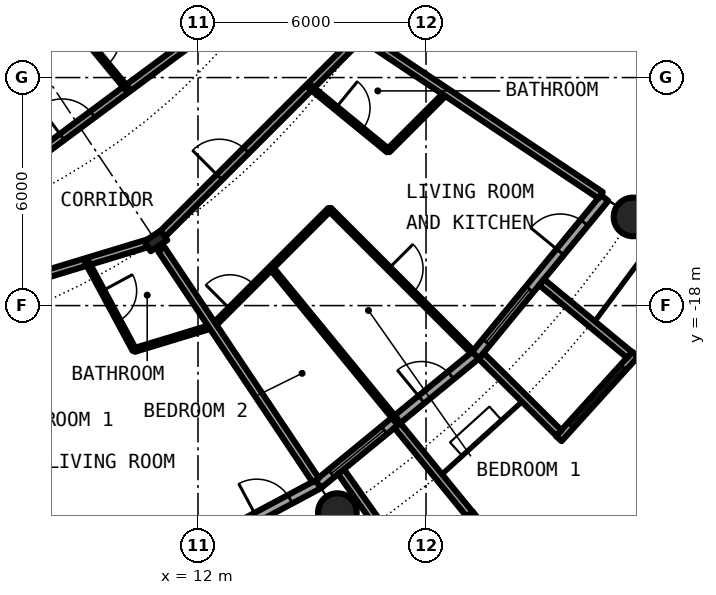
"""IFC4 building model, lengths in metres.
Left out: names, types, materials, properties, quantities, classifications, styles, units other than length and angle.
Written with IfcOpenShell. Run it as: python <this file> out.ifc"""

import sys

from ifc_helpers import new_model, si_unit, direction, frame, frame_2d, origin, origin_2d, place, context, subcontext, project, spatial, rectangle, circle, hollow_circle, i_section, extrude, element, fill, save


model = new_model("IFC4")
c1 = context("Model", 3, precision=1e-05, world=origin(), true_north=direction((0.0, 1.0)))
c2 = subcontext(c1, "Body", "Model", "MODEL_VIEW")
j1 = project(units=[si_unit("LENGTHUNIT", "METRE"), si_unit("PLANEANGLEUNIT", "RADIAN")], contexts=[c1])
p1 = place(None, origin())
s1 = spatial("IfcSite", under=j1, at=p1, CompositionType="ELEMENT")
p2 = place(p1, origin())
s2 = spatial("IfcBuilding", under=s1, at=p2, CompositionType="ELEMENT")
p3 = place(p2, frame((0.0, 0.0, 72.75)))
s3 = spatial("IfcBuildingStorey", under=s2, at=p3, CompositionType="ELEMENT", Elevation=72.75)
for number, where, z_axis, x_axis in (
    (1, (15.667, -23.448, 0.0), (0.0, 0.0, 1.0), (1.0, 0.0, 0.0)),
    (2, (23.448, -15.667, 0.0), (0.0, 0.0, 1.0), (1.0, 0.0, 0.0)),
):
    element("IfcColumn", number, at=place(p3, frame(where, z_axis=z_axis, x_axis=x_axis)), inside=s3, PredefinedType="COLUMN", context=c2, shape_type="SweptSolid", body=[
        extrude(hollow_circle(Radius=0.508, WallThickness=0.04, at=origin_2d()), origin(), (0.0, 0.0, 1.0), 3.05),
    ])
p4 = place(p3, frame((10.889, -16.297, 0.0), z_axis=(0.0, 0.0, 1.0), x_axis=(0.55557023302, -0.831469612303, 0.0)))
e3 = element("IfcColumn", 3, at=p4, inside=s3, PredefinedType="COLUMN", context=c2, shape_type="SweptSolid", body=[
    extrude(i_section(OverallWidth=0.306, OverallDepth=0.524, WebThickness=0.021, FlangeThickness=0.04, FilletRadius=0.027, at=origin_2d()), origin(), (0.0, 0.0, 1.0), 3.05),
])
p5 = place(p3, frame((10.447, -25.222, 0.0), z_axis=(0.0, 0.0, 1.0), x_axis=(0.881915646801, 0.471407246368, 0.0)))
e4 = element("IfcWall", 4, at=p5, inside=s3, PredefinedType="SOLIDWALL", context=c2, shape_type="SweptSolid", body=[
    extrude(rectangle(XDim=5.352, YDim=0.25, at=frame_2d((2.676, 0.0))), origin(), (0.0, 0.0, 1.0), 2.7),
])
p6 = place(p5, frame((0.441, 0.0, 0.3)))
e5 = element("IfcOpeningElement", 5, at=p6, cuts=e4, PredefinedType="OPENING", context=c2, shape_type="SweptSolid", body=[
    extrude(rectangle(XDim=1.8, YDim=2.1, at=frame_2d((0.9, 1.05))), frame((0.0, 0.135, 0.0), z_axis=(0.0, -1.0, 0.0), x_axis=(1.0, 0.0, 0.0)), (0.0, 0.0, 1.0), 0.27),
])
p7 = place(p5, frame((3.51, 0.0, 0.0)))
e6 = element("IfcOpeningElement", 6, at=p7, cuts=e4, PredefinedType="OPENING", context=c2, shape_type="SweptSolid", body=[
    extrude(rectangle(XDim=1.0, YDim=2.2, at=frame_2d((0.5, 1.1))), frame((0.0, 0.135, 0.0), z_axis=(0.0, -1.0, 0.0), x_axis=(1.0, 0.0, 0.0)), (0.0, 0.0, 1.0), 0.27),
])
p8 = place(p3, frame((15.167, -22.699, 0.0), z_axis=(0.0, 0.0, 1.0), x_axis=(0.773019449054, 0.634382322723, 0.0)))
e7 = element("IfcWall", 7, at=p8, inside=s3, PredefinedType="SOLIDWALL", context=c2, shape_type="SweptSolid", body=[
    extrude(rectangle(XDim=5.352, YDim=0.25, at=frame_2d((2.676, 0.0))), origin(), (0.0, 0.0, 1.0), 2.7),
])
p9 = place(p8, frame((0.441, 0.0, 0.3)))
e8 = element("IfcOpeningElement", 8, at=p9, cuts=e7, PredefinedType="OPENING", context=c2, shape_type="SweptSolid", body=[
    extrude(rectangle(XDim=1.8, YDim=2.1, at=frame_2d((0.9, 1.05))), frame((0.0, 0.135, 0.0), z_axis=(0.0, -1.0, 0.0), x_axis=(1.0, 0.0, 0.0)), (0.0, 0.0, 1.0), 0.27),
])
p10 = place(p8, frame((3.51, 0.0, 0.0)))
e9 = element("IfcOpeningElement", 9, at=p10, cuts=e7, PredefinedType="OPENING", context=c2, shape_type="SweptSolid", body=[
    extrude(rectangle(XDim=1.0, YDim=2.2, at=frame_2d((0.5, 1.1))), frame((0.0, 0.135, 0.0), z_axis=(0.0, -1.0, 0.0), x_axis=(1.0, 0.0, 0.0)), (0.0, 0.0, 1.0), 0.27),
])
p11 = place(p3, frame((17.427, -24.909, -0.03), z_axis=(0.0, 0.0, 1.0), x_axis=(0.796842165306, 0.60418752353, 0.0)))
e10 = element("IfcWall", 10, at=p11, inside=s3, PredefinedType="SOLIDWALL", context=c2, shape_type="SweptSolid", body=[
    extrude(rectangle(XDim=2.337, YDim=0.2, at=frame_2d((1.168, 0.0))), origin(), (0.0, 0.0, 1.0), 2.73),
])
p12 = place(p11, frame((0.128, 0.0, 0.33)))
e11 = element("IfcOpeningElement", 11, at=p12, cuts=e10, PredefinedType="OPENING", context=c2, shape_type="SweptSolid", body=[
    extrude(circle(Radius=1.04, at=frame_2d((1.04, 1.04))), frame((0.0, 0.11, 0.0), z_axis=(0.0, -1.0, 0.0), x_axis=(1.0, 0.0, 0.0)), (0.0, 0.0, 1.0), 0.22),
])
p13 = place(p3, frame((15.765, -22.37, -0.03), z_axis=(0.0, 0.0, 1.0), x_axis=(0.576274612209, -0.817256123454, 0.0)))
e12 = element("IfcWall", 12, at=p13, inside=s3, PredefinedType="SOLIDWALL", context=c2, shape_type="SweptSolid", body=[
    extrude(rectangle(XDim=2.933, YDim=0.2, at=frame_2d((1.466, 0.0))), origin(), (0.0, 0.0, 1.0), 2.73),
])
p14 = place(p3, frame((17.246, -21.155, -0.03), z_axis=(0.0, 0.0, 1.0), x_axis=(0.631741648902, -0.775179004516, 0.0)))
e13 = element("IfcWall", 13, at=p14, inside=s3, PredefinedType="SOLIDWALL", context=c2, shape_type="SweptSolid", body=[
    extrude(rectangle(XDim=3.006, YDim=0.2, at=frame_2d((1.503, 0.0))), origin(), (0.0, 0.0, 1.0), 2.73),
])
p15 = place(p3, frame((19.304, -19.304, 0.0), z_axis=(0.0, 0.0, 1.0), x_axis=(0.634382322723, 0.773019449054, 0.0)))
e14 = element("IfcWall", 14, at=p15, inside=s3, PredefinedType="SOLIDWALL", context=c2, shape_type="SweptSolid", body=[
    extrude(rectangle(XDim=5.352, YDim=0.25, at=frame_2d((2.676, 0.0))), origin(), (0.0, 0.0, 1.0), 2.7),
])
p16 = place(p15, frame((0.441, 0.0, 0.3)))
e15 = element("IfcOpeningElement", 15, at=p16, cuts=e14, PredefinedType="OPENING", context=c2, shape_type="SweptSolid", body=[
    extrude(rectangle(XDim=1.8, YDim=2.1, at=frame_2d((0.9, 1.05))), frame((0.0, 0.135, 0.0), z_axis=(0.0, -1.0, 0.0), x_axis=(1.0, 0.0, 0.0)), (0.0, 0.0, 1.0), 0.27),
])
p17 = place(p15, frame((3.51, 0.0, 0.0)))
e16 = element("IfcOpeningElement", 16, at=p17, cuts=e14, PredefinedType="OPENING", context=c2, shape_type="SweptSolid", body=[
    extrude(rectangle(XDim=1.0, YDim=2.2, at=frame_2d((0.5, 1.1))), frame((0.0, 0.135, 0.0), z_axis=(0.0, -1.0, 0.0), x_axis=(1.0, 0.0, 0.0)), (0.0, 0.0, 1.0), 0.27),
])
p18 = place(p3, frame((21.493, -21.5, -0.03), z_axis=(0.0, 0.0, 1.0), x_axis=(0.671506829416, 0.740998365753, 0.0)))
e17 = element("IfcWall", 17, at=p18, inside=s3, PredefinedType="SOLIDWALL", context=c2, shape_type="SweptSolid", body=[
    extrude(rectangle(XDim=2.993, YDim=0.2, at=frame_2d((1.497, 0.0))), origin(), (0.0, 0.0, 1.0), 2.73),
])
p19 = place(p18, frame((0.457, 0.0, 0.33)))
e18 = element("IfcOpeningElement", 18, at=p19, cuts=e17, PredefinedType="OPENING", context=c2, shape_type="SweptSolid", body=[
    extrude(circle(Radius=1.04, at=frame_2d((1.04, 1.04))), frame((0.0, 0.11, 0.0), z_axis=(0.0, -1.0, 0.0), x_axis=(1.0, 0.0, 0.0)), (0.0, 0.0, 1.0), 0.22),
])
p20 = place(p3, frame((19.45, -19.323, -0.03), z_axis=(0.0, 0.0, 1.0), x_axis=(0.709727076896, -0.704476739375, 0.0)))
e19 = element("IfcWall", 19, at=p20, inside=s3, PredefinedType="SOLIDWALL", context=c2, shape_type="SweptSolid", body=[
    extrude(rectangle(XDim=2.883, YDim=0.2, at=frame_2d((1.441, 0.0))), origin(), (0.0, 0.0, 1.0), 2.73),
])
p21 = place(p3, frame((21.041, -17.384, -0.03), z_axis=(0.0, 0.0, 1.0), x_axis=(0.770784861449, -0.63709551667, 0.0)))
e20 = element("IfcWall", 20, at=p21, inside=s3, PredefinedType="SOLIDWALL", context=c2, shape_type="SweptSolid", body=[
    extrude(rectangle(XDim=3.006, YDim=0.2, at=frame_2d((1.503, 0.0))), origin(), (0.0, 0.0, 1.0), 2.73),
])
p22 = place(p3, frame((12.386, -18.545, 0.0), z_axis=(0.0, 0.0, 1.0), x_axis=(0.707106781187, 0.707106781187, 0.0)))
e21 = element("IfcWall", 21, at=p22, inside=s3, PredefinedType="PARTITIONING", context=c2, shape_type="SweptSolid", body=[
    extrude(rectangle(XDim=4.351, YDim=0.1, at=frame_2d((2.176, 0.0))), origin(), (0.0, 0.0, 1.0), 2.7),
])
p23 = place(p22, frame((0.644, 0.0, 0.0)))
e22 = element("IfcOpeningElement", 22, at=p23, cuts=e21, PredefinedType="OPENING", context=c2, shape_type="SweptSolid", body=[
    extrude(rectangle(XDim=0.9, YDim=2.3, at=frame_2d((0.45, 1.15))), frame((0.0, 0.06, 0.0), z_axis=(0.0, -1.0, 0.0), x_axis=(1.0, 0.0, 0.0)), (0.0, 0.0, 1.0), 0.12),
])
p24 = place(p3, frame((17.004, -13.927, 0.0), z_axis=(0.0, 0.0, 1.0), x_axis=(0.707106781187, 0.707106781187, 0.0)))
e23 = element("IfcWall", 23, at=p24, inside=s3, PredefinedType="PARTITIONING", context=c2, shape_type="SweptSolid", body=[
    extrude(rectangle(XDim=2.175, YDim=0.1, at=frame_2d((1.088, 0.0))), origin(), (0.0, 0.0, 1.0), 2.7),
])
p25 = place(p3, frame((10.327, -19.168, 0.0), z_axis=(0.0, 0.0, 1.0), x_axis=(0.956877769253, 0.290490851335, 0.0)))
e24 = element("IfcWall", 24, at=p25, inside=s3, PredefinedType="PARTITIONING", context=c2, shape_type="SweptSolid", body=[
    extrude(rectangle(XDim=2.158, YDim=0.1, at=frame_2d((1.079, 0.0))), origin(), (0.0, 0.0, 1.0), 2.7),
])
p26 = place(p3, frame((11.0, -16.186, 0.0), z_axis=(0.0, 0.0, 1.0), x_axis=(0.707106781187, 0.707106781187, 0.0)))
e25 = element("IfcWall", 25, at=p26, inside=s3, PredefinedType="PARTITIONING", context=c2, shape_type="SweptSolid", body=[
    extrude(rectangle(XDim=7.334, YDim=0.2, at=frame_2d((3.667, 0.0))), origin(), (0.0, 0.0, 1.0), 2.38),
])
p27 = place(p26, frame((2.211, 0.0, 0.0)))
e26 = element("IfcOpeningElement", 26, at=p27, cuts=e25, PredefinedType="OPENING", context=c2, shape_type="SweptSolid", body=[
    extrude(rectangle(XDim=1.0, YDim=2.3, at=frame_2d((0.5, 1.15))), frame((0.0, 0.11, 0.0), z_axis=(0.0, -1.0, 0.0), x_axis=(1.0, 0.0, 0.0)), (0.0, 0.0, 1.0), 0.22),
])
p28 = place(p3, frame((0.0, -19.6, 0.0), z_axis=(0.0, 0.0, 1.0), x_axis=(0.956932298225, 0.290311172044, 0.0)))
e27 = element("IfcWall", 27, at=p28, inside=s3, PredefinedType="PARTITIONING", context=c2, shape_type="SweptSolid", body=[
    extrude(rectangle(XDim=11.219, YDim=0.2, at=frame_2d((5.61, 0.0))), origin(), (0.0, 0.0, 1.0), 2.38),
])
p29 = place(p28, frame((7.086, 0.0, 0.0)))
e28 = element("IfcOpeningElement", 28, at=p29, cuts=e27, PredefinedType="OPENING", context=c2, shape_type="SweptSolid", body=[
    extrude(rectangle(XDim=1.0, YDim=2.3, at=frame_2d((0.5, 1.15))), frame((0.0, 0.11, 0.0), z_axis=(0.0, -1.0, 0.0), x_axis=(1.0, 0.0, 0.0)), (0.0, 0.0, 1.0), 0.22),
])
p30 = place(p3, frame((4.906, -16.172, 0.0), z_axis=(0.0, 0.0, 1.0), x_axis=(0.803204584823, 0.59570327758, 0.0)))
e29 = element("IfcWall", 29, at=p30, inside=s3, PredefinedType="PARTITIONING", context=c2, shape_type="SweptSolid", body=[
    extrude(rectangle(XDim=11.387, YDim=0.2, at=frame_2d((5.693, 0.0))), origin(), (0.0, 0.0, 1.0), 2.7),
])
p31 = place(p30, frame((4.38, 0.0, 0.0)))
e30 = element("IfcOpeningElement", 30, at=p31, cuts=e29, PredefinedType="OPENING", context=c2, shape_type="SweptSolid", body=[
    extrude(rectangle(XDim=1.0, YDim=2.3, at=frame_2d((0.5, 1.15))), frame((0.0, 0.11, 0.0), z_axis=(0.0, -1.0, 0.0), x_axis=(1.0, 0.0, 0.0)), (0.0, 0.0, 1.0), 0.22),
])
p32 = place(p3, frame((4.908, -5.959, 0.0), z_axis=(0.0, 0.0, 1.0), x_axis=(0.636105207978, -0.771602335652, 0.0)))
e31 = element("IfcWall", 31, at=p32, inside=s3, PredefinedType="PARTITIONING", context=c2, shape_type="SweptSolid", body=[
    extrude(rectangle(XDim=8.213, YDim=0.1, at=frame_2d((4.106, 0.0))), origin(), (0.0, 0.0, 1.0), 2.7),
])
p33 = place(p32, frame((6.49, 0.0, 0.0)))
e32 = element("IfcOpeningElement", 32, at=p33, cuts=e31, PredefinedType="OPENING", context=c2, shape_type="SweptSolid", body=[
    extrude(rectangle(XDim=0.9, YDim=2.3, at=frame_2d((0.45, 1.15))), frame((0.0, 0.06, 0.0), z_axis=(0.0, -1.0, 0.0), x_axis=(1.0, 0.0, 0.0)), (0.0, 0.0, 1.0), 0.12),
])
p34 = place(p32, frame((2.384, 0.0, 0.0)))
e33 = element("IfcOpeningElement", 33, at=p34, cuts=e31, PredefinedType="OPENING", context=c2, shape_type="SweptSolid", body=[
    extrude(rectangle(XDim=0.9, YDim=2.3, at=frame_2d((0.45, 1.15))), frame((0.0, 0.06, 0.0), z_axis=(0.0, -1.0, 0.0), x_axis=(1.0, 0.0, 0.0)), (0.0, 0.0, 1.0), 0.12),
])
p35 = place(p3, frame((9.074, -16.847, 0.0), z_axis=(0.0, 0.0, 1.0), x_axis=(0.474160570331, -0.880438387136, 0.0)))
e34 = element("IfcWall", 34, at=p35, inside=s3, PredefinedType="PARTITIONING", context=c2, shape_type="SweptSolid", body=[
    extrude(rectangle(XDim=2.636, YDim=0.1, at=frame_2d((1.318, 0.0))), origin(), (0.0, 0.0, 1.0), 2.7),
])
p36 = place(p35, frame((0.868, 0.0, 0.0)))
e35 = element("IfcOpeningElement", 35, at=p36, cuts=e34, PredefinedType="OPENING", context=c2, shape_type="SweptSolid", body=[
    extrude(rectangle(XDim=0.9, YDim=2.3, at=frame_2d((0.45, 1.15))), frame((0.0, 0.06, 0.0), z_axis=(0.0, -1.0, 0.0), x_axis=(1.0, 0.0, 0.0)), (0.0, 0.0, 1.0), 0.12),
])
p37 = place(p3, frame((11.034, -16.515, 0.0), z_axis=(0.0, 0.0, 1.0), x_axis=(0.555701298605, -0.831382022135, 0.0)))
e36 = element("IfcWall", 36, at=p37, inside=s3, PredefinedType="PARTITIONING", context=c2, shape_type="SweptSolid", body=[
    extrude(rectangle(XDim=7.313, YDim=0.2, at=frame_2d((3.657, 0.0))), origin(), (0.0, 0.0, 1.0), 2.7),
])
p38 = place(p3, frame((13.927, -17.004, 0.0), z_axis=(0.0, 0.0, 1.0), x_axis=(0.633774976367, -0.773517471898, 0.0)))
e37 = element("IfcWall", 37, at=p38, inside=s3, PredefinedType="PARTITIONING", context=c2, shape_type="SweptSolid", body=[
    extrude(rectangle(XDim=5.196, YDim=0.1, at=frame_2d((2.598, 0.0))), origin(), (0.0, 0.0, 1.0), 2.7),
])
p39 = place(p3, frame((14.945, -12.241, 0.0), z_axis=(0.0, 0.0, 1.0), x_axis=(0.77367517848, -0.633582447834, 0.0)))
e38 = element("IfcWall", 38, at=p39, inside=s3, PredefinedType="PARTITIONING", context=c2, shape_type="SweptSolid", body=[
    extrude(rectangle(XDim=2.661, YDim=0.1, at=frame_2d((1.331, 0.0))), origin(), (0.0, 0.0, 1.0), 2.7),
])
p40 = place(p39, frame((0.881, 0.0, 0.0)))
e39 = element("IfcOpeningElement", 39, at=p40, cuts=e38, PredefinedType="OPENING", context=c2, shape_type="SweptSolid", body=[
    extrude(rectangle(XDim=0.9, YDim=2.3, at=frame_2d((0.45, 1.15))), frame((0.0, 0.06, 0.0), z_axis=(0.0, -1.0, 0.0), x_axis=(1.0, 0.0, 0.0)), (0.0, 0.0, 1.0), 0.12),
])
p41 = place(p3, frame((15.465, -15.465, 0.0), z_axis=(0.0, 0.0, 1.0), x_axis=(0.707106781187, -0.707106781187, 0.0)))
e40 = element("IfcWall", 40, at=p41, inside=s3, PredefinedType="PARTITIONING", context=c2, shape_type="SweptSolid", body=[
    extrude(rectangle(XDim=5.305, YDim=0.1, at=frame_2d((2.652, 0.0))), origin(), (0.0, 0.0, 1.0), 2.7),
])
p42 = place(p41, frame((2.202, 0.0, 0.0)))
e41 = element("IfcOpeningElement", 41, at=p42, cuts=e40, PredefinedType="OPENING", context=c2, shape_type="SweptSolid", body=[
    extrude(rectangle(XDim=0.9, YDim=2.3, at=frame_2d((0.45, 1.15))), frame((0.0, 0.06, 0.0), z_axis=(0.0, -1.0, 0.0), x_axis=(1.0, 0.0, 0.0)), (0.0, 0.0, 1.0), 0.12),
])
p43 = place(p3, frame((16.515, -11.035, 0.0), z_axis=(0.0, 0.0, 1.0), x_axis=(0.831505405283, -0.555516661303, 0.0)))
e42 = element("IfcWall", 42, at=p43, inside=s3, PredefinedType="PARTITIONING", context=c2, shape_type="SweptSolid", body=[
    extrude(rectangle(XDim=7.312, YDim=0.2, at=frame_2d((3.656, 0.0))), origin(), (0.0, 0.0, 1.0), 2.7),
])
p44 = place(p7, origin())
e43 = element("IfcDoor", 43, at=p44, inside=s3, OperationType="SINGLE_SWING_LEFT", PredefinedType="DOOR", context=c2, shape_type="SweptSolid", body=[
    extrude(rectangle(XDim=1.0, YDim=2.2, at=frame_2d((0.5, 1.1))), frame((0.0, 0.025, 0.0), z_axis=(0.0, -1.0, 0.0), x_axis=(1.0, 0.0, 0.0)), (0.0, 0.0, 1.0), 0.05),
])
fill(e6, e43)
p45 = place(p9, origin())
e44 = element("IfcWindow", 44, at=p45, inside=s3, PartitioningType="SINGLE_PANEL", PredefinedType="WINDOW", context=c2, shape_type="SweptSolid", body=[
    extrude(rectangle(XDim=1.8, YDim=2.1, at=frame_2d((0.9, 1.05))), frame((0.0, 0.03, 0.0), z_axis=(0.0, -1.0, 0.0), x_axis=(1.0, 0.0, 0.0)), (0.0, 0.0, 1.0), 0.06),
])
fill(e8, e44)
p46 = place(p10, origin())
e45 = element("IfcDoor", 45, at=p46, inside=s3, OperationType="SINGLE_SWING_LEFT", PredefinedType="DOOR", context=c2, shape_type="SweptSolid", body=[
    extrude(rectangle(XDim=1.0, YDim=2.2, at=frame_2d((0.5, 1.1))), frame((0.0, 0.025, 0.0), z_axis=(0.0, -1.0, 0.0), x_axis=(1.0, 0.0, 0.0)), (0.0, 0.0, 1.0), 0.05),
])
fill(e9, e45)
p47 = place(p16, origin())
e46 = element("IfcWindow", 46, at=p47, inside=s3, PartitioningType="SINGLE_PANEL", PredefinedType="WINDOW", context=c2, shape_type="SweptSolid", body=[
    extrude(rectangle(XDim=1.8, YDim=2.1, at=frame_2d((0.9, 1.05))), frame((0.0, 0.03, 0.0), z_axis=(0.0, -1.0, 0.0), x_axis=(1.0, 0.0, 0.0)), (0.0, 0.0, 1.0), 0.06),
])
fill(e15, e46)
p48 = place(p19, origin())
e47 = element("IfcWindow", 47, at=p48, inside=s3, PartitioningType="SINGLE_PANEL", PredefinedType="WINDOW", context=c2, shape_type="SweptSolid", body=[
    extrude(circle(Radius=1.04, at=frame_2d((1.04, 1.04))), frame((0.0, 0.03, 0.0), z_axis=(0.0, -1.0, 0.0), x_axis=(1.0, 0.0, 0.0)), (0.0, 0.0, 1.0), 0.06),
])
fill(e18, e47)
p49 = place(p17, origin())
e48 = element("IfcDoor", 48, at=p49, inside=s3, OperationType="SINGLE_SWING_LEFT", PredefinedType="DOOR", context=c2, shape_type="SweptSolid", body=[
    extrude(rectangle(XDim=1.0, YDim=2.2, at=frame_2d((0.5, 1.1))), frame((0.0, 0.025, 0.0), z_axis=(0.0, -1.0, 0.0), x_axis=(1.0, 0.0, 0.0)), (0.0, 0.0, 1.0), 0.05),
])
fill(e16, e48)
p50 = place(p36, origin())
e49 = element("IfcDoor", 49, at=p50, inside=s3, OperationType="SINGLE_SWING_RIGHT", PredefinedType="DOOR", context=c2, shape_type="SweptSolid", body=[
    extrude(rectangle(XDim=0.9, YDim=2.3, at=frame_2d((0.45, 1.15))), frame((0.0, 0.025, 0.0), z_axis=(0.0, -1.0, 0.0), x_axis=(1.0, 0.0, 0.0)), (0.0, 0.0, 1.0), 0.05),
])
fill(e35, e49)
p51 = place(p27, origin())
e50 = element("IfcDoor", 50, at=p51, inside=s3, OperationType="SINGLE_SWING_LEFT", PredefinedType="DOOR", context=c2, shape_type="SweptSolid", body=[
    extrude(rectangle(XDim=1.0, YDim=2.3, at=frame_2d((0.5, 1.15))), frame((0.0, 0.025, 0.0), z_axis=(0.0, -1.0, 0.0), x_axis=(1.0, 0.0, 0.0)), (0.0, 0.0, 1.0), 0.05),
])
fill(e26, e50)
p52 = place(p40, origin())
e51 = element("IfcDoor", 51, at=p52, inside=s3, OperationType="SINGLE_SWING_LEFT", PredefinedType="DOOR", context=c2, shape_type="SweptSolid", body=[
    extrude(rectangle(XDim=0.9, YDim=2.3, at=frame_2d((0.45, 1.15))), frame((0.0, 0.025, 0.0), z_axis=(0.0, -1.0, 0.0), x_axis=(1.0, 0.0, 0.0)), (0.0, 0.0, 1.0), 0.05),
])
fill(e39, e51)
p53 = place(p42, origin())
e52 = element("IfcDoor", 52, at=p53, inside=s3, OperationType="SINGLE_SWING_RIGHT", PredefinedType="DOOR", context=c2, shape_type="SweptSolid", body=[
    extrude(rectangle(XDim=0.9, YDim=2.3, at=frame_2d((0.45, 1.15))), frame((0.0, 0.025, 0.0), z_axis=(0.0, -1.0, 0.0), x_axis=(1.0, 0.0, 0.0)), (0.0, 0.0, 1.0), 0.05),
])
fill(e41, e52)
p54 = place(p23, origin())
e53 = element("IfcDoor", 53, at=p54, inside=s3, OperationType="SINGLE_SWING_LEFT", PredefinedType="DOOR", context=c2, shape_type="SweptSolid", body=[
    extrude(rectangle(XDim=0.9, YDim=2.3, at=frame_2d((0.45, 1.15))), frame((0.0, 0.025, 0.0), z_axis=(0.0, -1.0, 0.0), x_axis=(1.0, 0.0, 0.0)), (0.0, 0.0, 1.0), 0.05),
])
fill(e22, e53)
p55 = place(p31, origin())
e54 = element("IfcDoor", 54, at=p55, inside=s3, OperationType="SINGLE_SWING_LEFT", PredefinedType="DOOR", context=c2, shape_type="SweptSolid", body=[
    extrude(rectangle(XDim=1.0, YDim=2.3, at=frame_2d((0.5, 1.15))), frame((0.0, 0.025, 0.0), z_axis=(0.0, -1.0, 0.0), x_axis=(1.0, 0.0, 0.0)), (0.0, 0.0, 1.0), 0.05),
])
fill(e30, e54)
p56 = place(p33, origin())
e55 = element("IfcDoor", 55, at=p56, inside=s3, OperationType="SINGLE_SWING_RIGHT", PredefinedType="DOOR", context=c2, shape_type="SweptSolid", body=[
    extrude(rectangle(XDim=0.9, YDim=2.3, at=frame_2d((0.45, 1.15))), frame((0.0, 0.025, 0.0), z_axis=(0.0, -1.0, 0.0), x_axis=(1.0, 0.0, 0.0)), (0.0, 0.0, 1.0), 0.05),
])
fill(e32, e55)
save(model, sys.argv[1])
